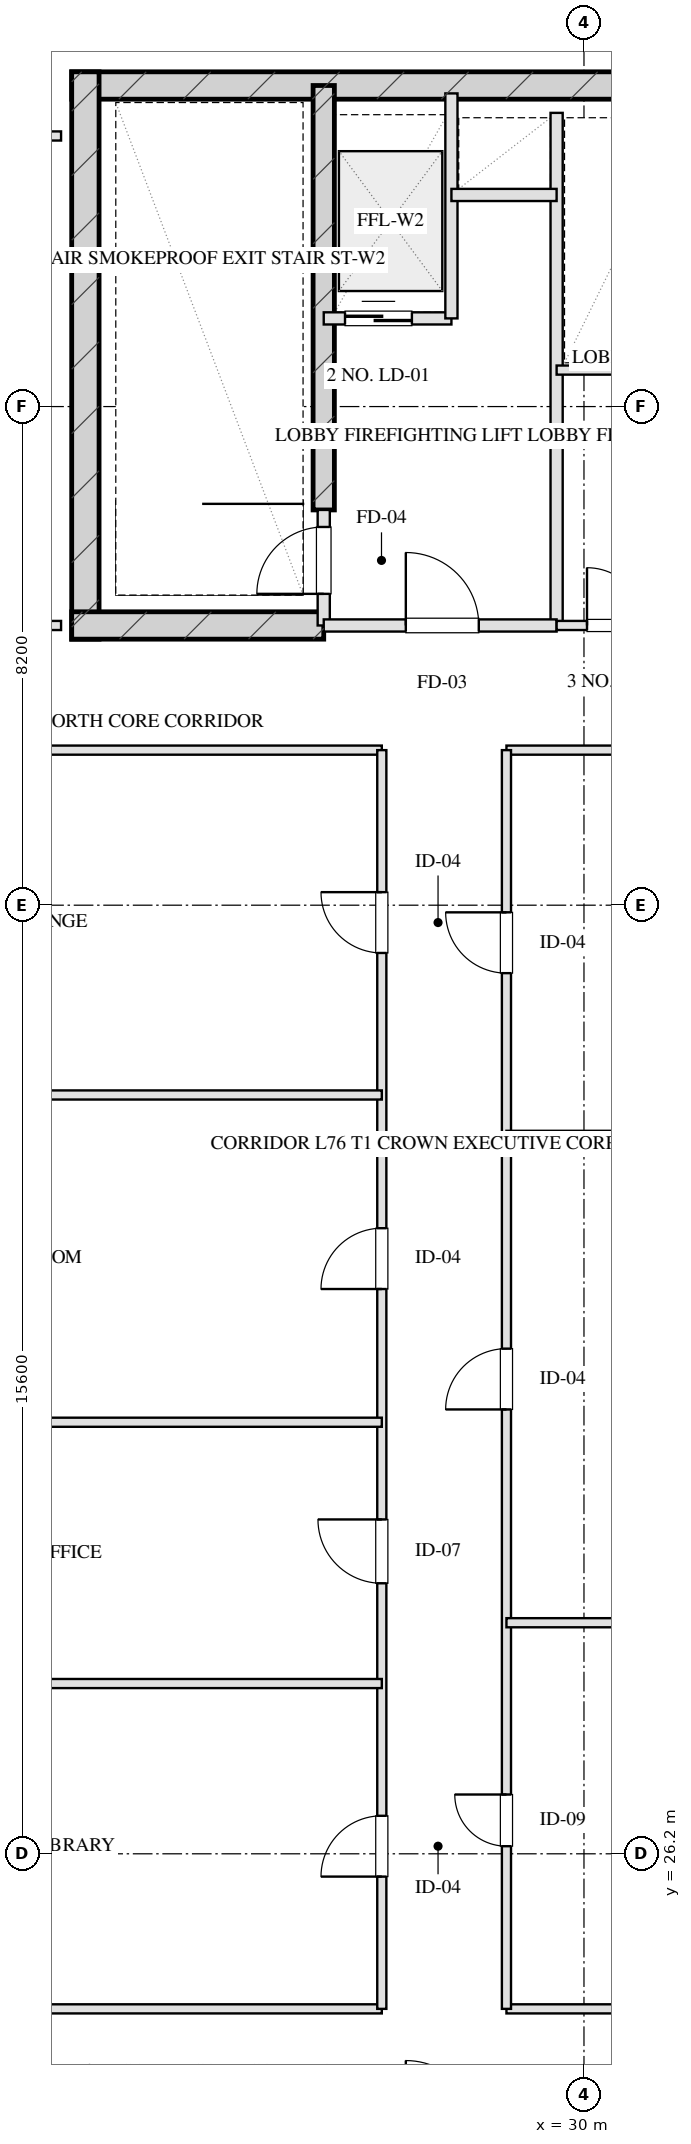
"""IFC4 building model, lengths in metres.
Left out: names, types, materials, properties, quantities, classifications, styles, units other than length and angle.
Written with IfcOpenShell. Run it as: python <this file> out.ifc"""

import sys

from ifc_helpers import new_model, si_unit, direction, frame, frame_2d, origin, place, context, subcontext, project, spatial, rectangle, extrude, element, fill, save


model = new_model("IFC4")
c1 = context("Model", 3, precision=1e-05, world=origin(), true_north=direction((0.0, 1.0)))
c2 = subcontext(c1, "Body", "Model", "MODEL_VIEW")
j1 = project(units=[si_unit("LENGTHUNIT", "METRE"), si_unit("PLANEANGLEUNIT", "RADIAN")], contexts=[c1])
p1 = place(None, origin())
s1 = spatial("IfcSite", under=j1, at=p1, CompositionType="ELEMENT")
p2 = place(p1, origin())
s2 = spatial("IfcBuilding", under=s1, at=p2, CompositionType="ELEMENT")
p3 = place(p2, frame((0.0, 0.0, 276.0)))
s3 = spatial("IfcBuildingStorey", under=s2, at=p3, CompositionType="ELEMENT", Elevation=276.0)
p4 = place(p3, frame((21.575, 55.28, 0.0), z_axis=(0.0, 0.0, 1.0), x_axis=(1.0, 0.0, 0.0)))
e1 = element("IfcWall", 1, at=p4, inside=s3, PredefinedType="SHEAR", context=c2, shape_type="SweptSolid", body=[
    extrude(rectangle(XDim=16.85, YDim=0.45, at=frame_2d((8.425, 0.0))), origin(), (0.0, 0.0, 1.0), 4.2),
])
p5 = place(p3, frame((21.8, 46.175, 0.0), z_axis=(0.0, 0.0, 1.0), x_axis=(0.0, 1.0, 0.0)))
e2 = element("IfcWall", 2, at=p5, inside=s3, PredefinedType="SHEAR", context=c2, shape_type="SweptSolid", body=[
    extrude(rectangle(XDim=9.33, YDim=0.45, at=frame_2d((4.665, 0.0))), origin(), (0.0, 0.0, 1.0), 4.2),
])
p6 = place(p3, frame((25.72, 48.3, 0.0), z_axis=(0.0, 0.0, 1.0), x_axis=(0.0, 1.0, 0.0)))
e3 = element("IfcWall", 3, at=p6, inside=s3, PredefinedType="SHEAR", context=c2, shape_type="SweptSolid", body=[
    extrude(rectangle(XDim=6.98, YDim=0.35, at=frame_2d((3.49, 0.0))), origin(), (0.0, 0.0, 1.0), 4.2),
])
p7 = place(p3, frame((21.575, 46.4, 0.0), z_axis=(0.0, 0.0, 1.0), x_axis=(1.0, 0.0, 0.0)))
e4 = element("IfcWall", 4, at=p7, inside=s3, PredefinedType="SHEAR", context=c2, shape_type="SweptSolid", body=[
    extrude(rectangle(XDim=4.145, YDim=0.45, at=frame_2d((2.073, 0.0))), origin(), (0.0, 0.0, 1.0), 4.2),
])
p8 = place(p3, frame((25.72, 46.4, 0.0), z_axis=(0.0, 0.0, 1.0), x_axis=(0.0, 1.0, 0.0)))
e5 = element("IfcWall", 5, at=p8, inside=s3, PredefinedType="PARTITIONING", context=c2, shape_type="SweptSolid", body=[
    extrude(rectangle(XDim=1.9, YDim=0.2, at=frame_2d((0.95, 0.0))), origin(), (0.0, 0.0, 1.0), 3.925),
])
p9 = place(p8, frame((0.52, 0.0, 0.0)))
e6 = element("IfcOpeningElement", 6, at=p9, cuts=e5, PredefinedType="OPENING", context=c2, shape_type="SweptSolid", body=[
    extrude(rectangle(XDim=1.1, YDim=2.05, at=frame_2d((0.55, 1.025))), frame((0.0, 0.11, 0.0), z_axis=(0.0, -1.0, 0.0), x_axis=(1.0, 0.0, 0.0)), (0.0, 0.0, 1.0), 0.22),
])
p10 = place(p3, frame((29.55, 46.4, 0.0), z_axis=(0.0, 0.0, 1.0), x_axis=(0.0, 1.0, 0.0)))
e7 = element("IfcWall", 7, at=p10, inside=s3, PredefinedType="PARTITIONING", context=c2, shape_type="SweptSolid", body=[
    extrude(rectangle(XDim=8.43, YDim=0.2, at=frame_2d((4.215, 0.0))), origin(), (0.0, 0.0, 1.0), 3.925),
])
p11 = place(p3, frame((25.72, 46.4, 0.0), z_axis=(0.0, 0.0, 1.0), x_axis=(1.0, 0.0, 0.0)))
e8 = element("IfcWall", 8, at=p11, inside=s3, PredefinedType="PARTITIONING", context=c2, shape_type="SweptSolid", body=[
    extrude(rectangle(XDim=3.83, YDim=0.2, at=frame_2d((1.915, 0.0))), origin(), (0.0, 0.0, 1.0), 3.925),
])
p12 = place(p11, frame((1.35, 0.0, 0.0)))
e9 = element("IfcOpeningElement", 9, at=p12, cuts=e8, PredefinedType="OPENING", context=c2, shape_type="SweptSolid", body=[
    extrude(rectangle(XDim=1.2, YDim=2.05, at=frame_2d((0.6, 1.025))), frame((0.0, 0.11, 0.0), z_axis=(0.0, -1.0, 0.0), x_axis=(1.0, 0.0, 0.0)), (0.0, 0.0, 1.0), 0.22),
])
p13 = place(p3, frame((25.72, 51.45, 0.0), z_axis=(0.0, 0.0, 1.0), x_axis=(1.0, 0.0, 0.0)))
e10 = element("IfcWall", 10, at=p13, inside=s3, PredefinedType="PARTITIONING", context=c2, shape_type="SweptSolid", body=[
    extrude(rectangle(XDim=2.1, YDim=0.2, at=frame_2d((1.05, 0.0))), origin(), (0.0, 0.0, 1.0), 3.925),
])
p14 = place(p13, frame((0.35, 0.0, 0.0)))
e11 = element("IfcOpeningElement", 11, at=p14, cuts=e10, PredefinedType="OPENING", context=c2, shape_type="SweptSolid", body=[
    extrude(rectangle(XDim=1.1, YDim=2.05, at=frame_2d((0.55, 1.025))), frame((0.0, 0.11, 0.0), z_axis=(0.0, -1.0, 0.0), x_axis=(1.0, 0.0, 0.0)), (0.0, 0.0, 1.0), 0.22),
])
p15 = place(p3, frame((27.82, 51.45, 0.0), z_axis=(0.0, 0.0, 1.0), x_axis=(0.0, 1.0, 0.0)))
e12 = element("IfcWall", 12, at=p15, inside=s3, PredefinedType="PARTITIONING", context=c2, shape_type="SweptSolid", body=[
    extrude(rectangle(XDim=3.7, YDim=0.2, at=frame_2d((1.85, 0.0))), origin(), (0.0, 0.0, 1.0), 3.925),
])
p16 = place(p3, frame((27.82, 53.48, 0.0), z_axis=(0.0, 0.0, 1.0), x_axis=(1.0, 0.0, 0.0)))
e13 = element("IfcWall", 13, at=p16, inside=s3, PredefinedType="PARTITIONING", context=c2, shape_type="SweptSolid", body=[
    extrude(rectangle(XDim=1.73, YDim=0.2, at=frame_2d((0.865, 0.0))), origin(), (0.0, 0.0, 1.0), 3.925),
])
p17 = place(p3, frame((29.55, 46.4, 0.0), z_axis=(0.0, 0.0, 1.0), x_axis=(1.0, 0.0, 0.0)))
e14 = element("IfcWall", 14, at=p17, inside=s3, PredefinedType="PARTITIONING", context=c2, shape_type="SweptSolid", body=[
    extrude(rectangle(XDim=4.4, YDim=0.15, at=frame_2d((2.2, 0.0))), origin(), (0.0, 0.0, 1.0), 3.925),
])
p18 = place(p17, frame((0.5, 0.0, 0.0)))
e15 = element("IfcOpeningElement", 15, at=p18, cuts=e14, PredefinedType="OPENING", context=c2, shape_type="SweptSolid", body=[
    extrude(rectangle(XDim=0.95, YDim=2.05, at=frame_2d((0.475, 1.025))), frame((0.0, 0.085, 0.0), z_axis=(0.0, -1.0, 0.0), x_axis=(1.0, 0.0, 0.0)), (0.0, 0.0, 1.0), 0.17),
])
p19 = place(p17, frame((2.65, 0.0, 0.0)))
e16 = element("IfcOpeningElement", 16, at=p19, cuts=e14, PredefinedType="OPENING", context=c2, shape_type="SweptSolid", body=[
    extrude(rectangle(XDim=1.2, YDim=2.05, at=frame_2d((0.6, 1.025))), frame((0.0, 0.085, 0.0), z_axis=(0.0, -1.0, 0.0), x_axis=(1.0, 0.0, 0.0)), (0.0, 0.0, 1.0), 0.17),
])
p20 = place(p3, frame((29.55, 50.6, 0.0), z_axis=(0.0, 0.0, 1.0), x_axis=(1.0, 0.0, 0.0)))
e17 = element("IfcWall", 17, at=p20, inside=s3, PredefinedType="PARTITIONING", context=c2, shape_type="SweptSolid", body=[
    extrude(rectangle(XDim=2.23, YDim=0.15, at=frame_2d((1.115, 0.0))), origin(), (0.0, 0.0, 1.0), 3.925),
])
p21 = place(p3, frame((15.0, 54.45, 0.0), z_axis=(0.0, 0.0, 1.0), x_axis=(1.0, 0.0, 0.0)))
e18 = element("IfcWall", 18, at=p21, inside=s3, PredefinedType="PARTITIONING", context=c2, shape_type="SweptSolid", body=[
    extrude(rectangle(XDim=6.4, YDim=0.15, at=frame_2d((3.2, 0.0))), origin(), (0.0, 0.0, 1.0), 3.925),
])
p22 = place(p3, frame((15.0, 46.4, 0.0), z_axis=(0.0, 0.0, 1.0), x_axis=(1.0, 0.0, 0.0)))
e19 = element("IfcWall", 19, at=p22, inside=s3, PredefinedType="PARTITIONING", context=c2, shape_type="SweptSolid", body=[
    extrude(rectangle(XDim=6.4, YDim=0.15, at=frame_2d((3.2, 0.0))), origin(), (0.0, 0.0, 1.0), 3.925),
])
p23 = place(p22, frame((2.688, 0.0, 0.0)))
e20 = element("IfcOpeningElement", 20, at=p23, cuts=e19, PredefinedType="OPENING", context=c2, shape_type="SweptSolid", body=[
    extrude(rectangle(XDim=1.0, YDim=2.05, at=frame_2d((0.5, 1.025))), frame((0.0, 0.085, 0.0), z_axis=(0.0, -1.0, 0.0), x_axis=(1.0, 0.0, 0.0)), (0.0, 0.0, 1.0), 0.17),
])
p24 = place(p3, frame((15.0, 23.65, 0.0), z_axis=(0.0, 0.0, 1.0), x_axis=(1.0, 0.0, 0.0)))
e21 = element("IfcWall", 21, at=p24, inside=s3, PredefinedType="PARTITIONING", context=c2, shape_type="SweptSolid", body=[
    extrude(rectangle(XDim=11.675, YDim=0.15, at=frame_2d((5.837, 0.0))), origin(), (0.0, 0.0, 1.0), 3.925),
])
p25 = place(p3, frame((28.725, 23.65, 0.0), z_axis=(0.0, 0.0, 1.0), x_axis=(1.0, 0.0, 0.0)))
e22 = element("IfcWall", 22, at=p25, inside=s3, PredefinedType="PARTITIONING", context=c2, shape_type="SweptSolid", body=[
    extrude(rectangle(XDim=16.275, YDim=0.15, at=frame_2d((8.137, 0.0))), origin(), (0.0, 0.0, 1.0), 3.925),
])
p26 = place(p3, frame((15.0, 44.35, 0.0), z_axis=(0.0, 0.0, 1.0), x_axis=(1.0, 0.0, 0.0)))
e23 = element("IfcWall", 23, at=p26, inside=s3, PredefinedType="PARTITIONING", context=c2, shape_type="SweptSolid", body=[
    extrude(rectangle(XDim=11.675, YDim=0.15, at=frame_2d((5.837, 0.0))), origin(), (0.0, 0.0, 1.0), 3.925),
])
p27 = place(p3, frame((28.725, 44.35, 0.0), z_axis=(0.0, 0.0, 1.0), x_axis=(1.0, 0.0, 0.0)))
e24 = element("IfcWall", 24, at=p27, inside=s3, PredefinedType="PARTITIONING", context=c2, shape_type="SweptSolid", body=[
    extrude(rectangle(XDim=16.275, YDim=0.15, at=frame_2d((8.137, 0.0))), origin(), (0.0, 0.0, 1.0), 3.925),
])
p28 = place(p3, frame((26.675, 23.65, 0.0), z_axis=(0.0, 0.0, 1.0), x_axis=(0.0, 1.0, 0.0)))
e25 = element("IfcWall", 25, at=p28, inside=s3, PredefinedType="PARTITIONING", context=c2, shape_type="SweptSolid", body=[
    extrude(rectangle(XDim=20.7, YDim=0.15, at=frame_2d((10.35, 0.0))), origin(), (0.0, 0.0, 1.0), 3.925),
])
p29 = place(p28, frame((2.175, 0.0, 0.0)))
e26 = element("IfcOpeningElement", 26, at=p29, cuts=e25, PredefinedType="OPENING", context=c2, shape_type="SweptSolid", body=[
    extrude(rectangle(XDim=1.0, YDim=2.05, at=frame_2d((0.5, 1.025))), frame((0.0, 0.085, 0.0), z_axis=(0.0, -1.0, 0.0), x_axis=(1.0, 0.0, 0.0)), (0.0, 0.0, 1.0), 0.17),
])
p30 = place(p28, frame((6.999, 0.0, 0.0)))
e27 = element("IfcOpeningElement", 27, at=p30, cuts=e25, PredefinedType="OPENING", context=c2, shape_type="SweptSolid", body=[
    extrude(rectangle(XDim=1.05, YDim=2.05, at=frame_2d((0.525, 1.025))), frame((0.0, 0.085, 0.0), z_axis=(0.0, -1.0, 0.0), x_axis=(1.0, 0.0, 0.0)), (0.0, 0.0, 1.0), 0.17),
])
p31 = place(p28, frame((11.838, 0.0, 0.0)))
e28 = element("IfcOpeningElement", 28, at=p31, cuts=e25, PredefinedType="OPENING", context=c2, shape_type="SweptSolid", body=[
    extrude(rectangle(XDim=1.0, YDim=2.05, at=frame_2d((0.5, 1.025))), frame((0.0, 0.085, 0.0), z_axis=(0.0, -1.0, 0.0), x_axis=(1.0, 0.0, 0.0)), (0.0, 0.0, 1.0), 0.17),
])
p32 = place(p28, frame((17.365, 0.0, 0.0)))
e29 = element("IfcOpeningElement", 29, at=p32, cuts=e25, PredefinedType="OPENING", context=c2, shape_type="SweptSolid", body=[
    extrude(rectangle(XDim=1.0, YDim=2.05, at=frame_2d((0.5, 1.025))), frame((0.0, 0.085, 0.0), z_axis=(0.0, -1.0, 0.0), x_axis=(1.0, 0.0, 0.0)), (0.0, 0.0, 1.0), 0.17),
])
p33 = place(p3, frame((28.725, 23.65, 0.0), z_axis=(0.0, 0.0, 1.0), x_axis=(0.0, 1.0, 0.0)))
e30 = element("IfcWall", 30, at=p33, inside=s3, PredefinedType="PARTITIONING", context=c2, shape_type="SweptSolid", body=[
    extrude(rectangle(XDim=20.7, YDim=0.15, at=frame_2d((10.35, 0.0))), origin(), (0.0, 0.0, 1.0), 3.925),
])
p34 = place(p33, frame((2.675, 0.0, 0.0)))
e31 = element("IfcOpeningElement", 31, at=p34, cuts=e30, PredefinedType="OPENING", context=c2, shape_type="SweptSolid", body=[
    extrude(rectangle(XDim=0.85, YDim=2.05, at=frame_2d((0.425, 1.025))), frame((0.0, 0.085, 0.0), z_axis=(0.0, -1.0, 0.0), x_axis=(1.0, 0.0, 0.0)), (0.0, 0.0, 1.0), 0.17),
])
p35 = place(p33, frame((9.857, 0.0, 0.0)))
e32 = element("IfcOpeningElement", 32, at=p35, cuts=e30, PredefinedType="OPENING", context=c2, shape_type="SweptSolid", body=[
    extrude(rectangle(XDim=1.0, YDim=2.05, at=frame_2d((0.5, 1.025))), frame((0.0, 0.085, 0.0), z_axis=(0.0, -1.0, 0.0), x_axis=(1.0, 0.0, 0.0)), (0.0, 0.0, 1.0), 0.17),
])
p36 = place(p33, frame((17.032, 0.0, 0.0)))
e33 = element("IfcOpeningElement", 33, at=p36, cuts=e30, PredefinedType="OPENING", context=c2, shape_type="SweptSolid", body=[
    extrude(rectangle(XDim=1.0, YDim=2.05, at=frame_2d((0.5, 1.025))), frame((0.0, 0.085, 0.0), z_axis=(0.0, -1.0, 0.0), x_axis=(1.0, 0.0, 0.0)), (0.0, 0.0, 1.0), 0.17),
])
for number, where, z_axis, x_axis in (
    (34, (15.0, 29.0, 0.0), (0.0, 0.0, 1.0), (1.0, 0.0, 0.0)),
    (35, (15.0, 33.297, 0.0), (0.0, 0.0, 1.0), (1.0, 0.0, 0.0)),
    (36, (15.0, 38.679, 0.0), (0.0, 0.0, 1.0), (1.0, 0.0, 0.0)),
):
    element("IfcWall", number, at=place(p3, frame(where, z_axis=z_axis, x_axis=x_axis)), inside=s3, PredefinedType="PARTITIONING", context=c2, shape_type="SweptSolid", body=[
        extrude(rectangle(XDim=11.675, YDim=0.15, at=frame_2d((5.837, 0.0))), origin(), (0.0, 0.0, 1.0), 3.925),
    ])
for number, where, z_axis, x_axis in (
    (37, (28.725, 30.0, 0.0), (0.0, 0.0, 1.0), (1.0, 0.0, 0.0)),
    (38, (28.725, 38.015, 0.0), (0.0, 0.0, 1.0), (1.0, 0.0, 0.0)),
):
    element("IfcWall", number, at=place(p3, frame(where, z_axis=z_axis, x_axis=x_axis)), inside=s3, PredefinedType="PARTITIONING", context=c2, shape_type="SweptSolid", body=[
        extrude(rectangle(XDim=16.275, YDim=0.15, at=frame_2d((8.137, 0.0))), origin(), (0.0, 0.0, 1.0), 3.925),
    ])
p37 = place(p9, origin())
e39 = element("IfcDoor", 39, at=p37, inside=s3, OperationType="SINGLE_SWING_LEFT", PredefinedType="DOOR", context=c2, shape_type="SweptSolid", body=[
    extrude(rectangle(XDim=1.1, YDim=2.05, at=frame_2d((0.55, 1.025))), frame((0.0, 0.025, 0.0), z_axis=(0.0, -1.0, 0.0), x_axis=(1.0, 0.0, 0.0)), (0.0, 0.0, 1.0), 0.05),
])
fill(e6, e39)
p38 = place(p12, origin())
e40 = element("IfcDoor", 40, at=p38, inside=s3, OperationType="SINGLE_SWING_LEFT", PredefinedType="DOOR", context=c2, shape_type="SweptSolid", body=[
    extrude(rectangle(XDim=1.2, YDim=2.05, at=frame_2d((0.6, 1.025))), frame((0.0, 0.025, 0.0), z_axis=(0.0, -1.0, 0.0), x_axis=(1.0, 0.0, 0.0)), (0.0, 0.0, 1.0), 0.05),
])
fill(e9, e40)
p39 = place(p14, origin())
e41 = element("IfcDoor", 41, at=p39, inside=s3, OperationType="DOUBLE_DOOR_SLIDING", PredefinedType="DOOR", context=c2, shape_type="SweptSolid", body=[
    extrude(rectangle(XDim=1.1, YDim=2.05, at=frame_2d((0.55, 1.025))), frame((0.0, 0.025, 0.0), z_axis=(0.0, -1.0, 0.0), x_axis=(1.0, 0.0, 0.0)), (0.0, 0.0, 1.0), 0.05),
])
fill(e11, e41)
p40 = place(p18, origin())
e42 = element("IfcDoor", 42, at=p40, inside=s3, OperationType="SINGLE_SWING_LEFT", PredefinedType="DOOR", context=c2, shape_type="SweptSolid", body=[
    extrude(rectangle(XDim=0.95, YDim=2.05, at=frame_2d((0.475, 1.025))), frame((0.0, 0.025, 0.0), z_axis=(0.0, -1.0, 0.0), x_axis=(1.0, 0.0, 0.0)), (0.0, 0.0, 1.0), 0.05),
])
fill(e15, e42)
p41 = place(p29, origin())
e43 = element("IfcDoor", 43, at=p41, inside=s3, OperationType="SINGLE_SWING_LEFT", PredefinedType="DOOR", context=c2, shape_type="SweptSolid", body=[
    extrude(rectangle(XDim=1.0, YDim=2.05, at=frame_2d((0.5, 1.025))), frame((0.0, 0.025, 0.0), z_axis=(0.0, -1.0, 0.0), x_axis=(1.0, 0.0, 0.0)), (0.0, 0.0, 1.0), 0.05),
])
fill(e26, e43)
p42 = place(p30, origin())
e44 = element("IfcDoor", 44, at=p42, inside=s3, OperationType="SINGLE_SWING_RIGHT", PredefinedType="DOOR", context=c2, shape_type="SweptSolid", body=[
    extrude(rectangle(XDim=1.05, YDim=2.05, at=frame_2d((0.525, 1.025))), frame((0.0, 0.025, 0.0), z_axis=(0.0, -1.0, 0.0), x_axis=(1.0, 0.0, 0.0)), (0.0, 0.0, 1.0), 0.05),
])
fill(e27, e44)
p43 = place(p31, origin())
e45 = element("IfcDoor", 45, at=p43, inside=s3, OperationType="SINGLE_SWING_LEFT", PredefinedType="DOOR", context=c2, shape_type="SweptSolid", body=[
    extrude(rectangle(XDim=1.0, YDim=2.05, at=frame_2d((0.5, 1.025))), frame((0.0, 0.025, 0.0), z_axis=(0.0, -1.0, 0.0), x_axis=(1.0, 0.0, 0.0)), (0.0, 0.0, 1.0), 0.05),
])
fill(e28, e45)
p44 = place(p32, origin())
e46 = element("IfcDoor", 46, at=p44, inside=s3, OperationType="SINGLE_SWING_RIGHT", PredefinedType="DOOR", context=c2, shape_type="SweptSolid", body=[
    extrude(rectangle(XDim=1.0, YDim=2.05, at=frame_2d((0.5, 1.025))), frame((0.0, 0.025, 0.0), z_axis=(0.0, -1.0, 0.0), x_axis=(1.0, 0.0, 0.0)), (0.0, 0.0, 1.0), 0.05),
])
fill(e29, e46)
p45 = place(p34, origin())
e47 = element("IfcDoor", 47, at=p45, inside=s3, OperationType="SINGLE_SWING_RIGHT", PredefinedType="DOOR", context=c2, shape_type="SweptSolid", body=[
    extrude(rectangle(XDim=0.85, YDim=2.05, at=frame_2d((0.425, 1.025))), frame((0.0, 0.025, 0.0), z_axis=(0.0, -1.0, 0.0), x_axis=(1.0, 0.0, 0.0)), (0.0, 0.0, 1.0), 0.05),
])
fill(e31, e47)
p46 = place(p35, origin())
e48 = element("IfcDoor", 48, at=p46, inside=s3, OperationType="SINGLE_SWING_LEFT", PredefinedType="DOOR", context=c2, shape_type="SweptSolid", body=[
    extrude(rectangle(XDim=1.0, YDim=2.05, at=frame_2d((0.5, 1.025))), frame((0.0, 0.025, 0.0), z_axis=(0.0, -1.0, 0.0), x_axis=(1.0, 0.0, 0.0)), (0.0, 0.0, 1.0), 0.05),
])
fill(e32, e48)
p47 = place(p36, origin())
e49 = element("IfcDoor", 49, at=p47, inside=s3, OperationType="SINGLE_SWING_RIGHT", PredefinedType="DOOR", context=c2, shape_type="SweptSolid", body=[
    extrude(rectangle(XDim=1.0, YDim=2.05, at=frame_2d((0.5, 1.025))), frame((0.0, 0.025, 0.0), z_axis=(0.0, -1.0, 0.0), x_axis=(1.0, 0.0, 0.0)), (0.0, 0.0, 1.0), 0.05),
])
fill(e33, e49)
save(model, sys.argv[1])
